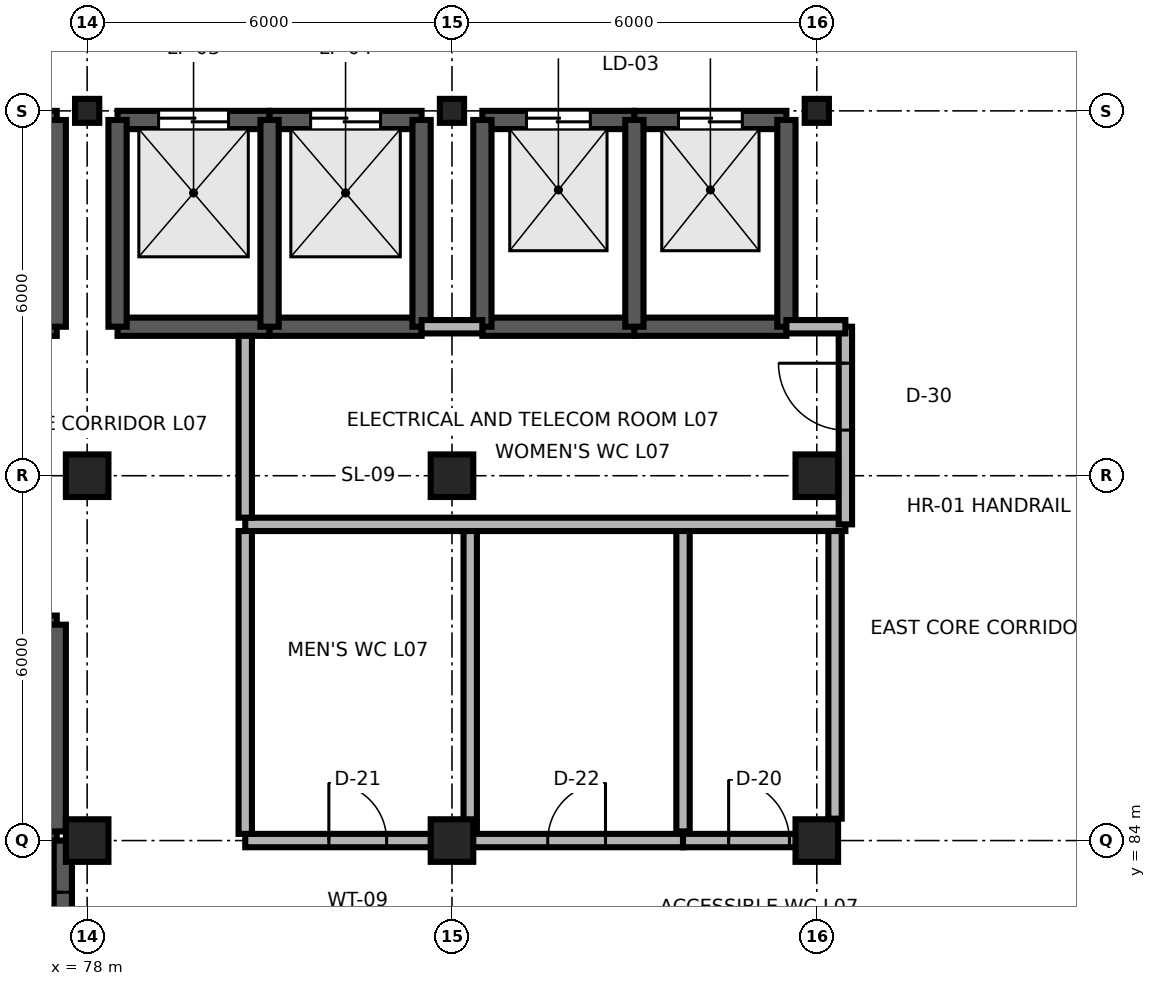
"""IFC4 building model, lengths in metres.
Left out: names, types, materials, properties, quantities, classifications, styles, units other than length and angle.
Written with IfcOpenShell. Run it as: python <this file> out.ifc"""

import sys

from ifc_helpers import new_model, si_unit, direction, frame, frame_2d, origin, origin_2d, place, context, subcontext, project, spatial, rectangle, i_section, extrude, element, fill, save


model = new_model("IFC4")
c1 = context("Model", 3, precision=1e-05, world=origin(), true_north=direction((0.0, 1.0)))
c2 = subcontext(c1, "Body", "Model", "MODEL_VIEW")
j1 = project(units=[si_unit("LENGTHUNIT", "METRE"), si_unit("PLANEANGLEUNIT", "RADIAN")], contexts=[c1])
p1 = place(None, origin())
s1 = spatial("IfcSite", under=j1, at=p1, CompositionType="ELEMENT")
p2 = place(p1, origin())
s2 = spatial("IfcBuilding", under=s1, at=p2, CompositionType="ELEMENT")
p3 = place(p2, frame((0.0, 0.0, 28.8)))
s3 = spatial("IfcBuildingStorey", under=s2, at=p3, CompositionType="ELEMENT", Elevation=28.8)
for number, where, z_axis, x_axis in (
    (1, (78.0, 84.0, 0.0), (0.0, 0.0, 1.0), (1.0, 0.0, 0.0)),
    (2, (84.0, 84.0, 0.0), (0.0, 0.0, 1.0), (1.0, 0.0, 0.0)),
    (3, (90.0, 84.0, 0.0), (0.0, 0.0, 1.0), (1.0, 0.0, 0.0)),
    (4, (78.0, 90.0, 0.0), (0.0, 0.0, 1.0), (1.0, 0.0, 0.0)),
    (5, (84.0, 90.0, 0.0), (0.0, 0.0, 1.0), (1.0, 0.0, 0.0)),
    (6, (90.0, 90.0, 0.0), (0.0, 0.0, 1.0), (1.0, 0.0, 0.0)),
):
    element("IfcColumn", number, at=place(p3, frame(where, z_axis=z_axis, x_axis=x_axis)), inside=s3, PredefinedType="COLUMN", context=c2, shape_type="SweptSolid", body=[
        extrude(rectangle(XDim=0.7, YDim=0.7, at=origin_2d()), origin(), (0.0, 0.0, 1.0), 3.9),
    ])
for number, where, z_axis, x_axis in (
    (7, (78.0, 96.0, 0.0), (0.0, 0.0, 1.0), (1.0, 0.0, 0.0)),
    (8, (84.0, 96.0, 0.0), (0.0, 0.0, 1.0), (1.0, 0.0, 0.0)),
    (9, (90.0, 96.0, 0.0), (0.0, 0.0, 1.0), (1.0, 0.0, 0.0)),
):
    element("IfcColumn", number, at=place(p3, frame(where, z_axis=z_axis, x_axis=x_axis)), inside=s3, PredefinedType="COLUMN", context=c2, shape_type="SweptSolid", body=[
        extrude(i_section(OverallWidth=0.398, OverallDepth=0.394, WebThickness=0.011, FlangeThickness=0.018, FilletRadius=0.022, at=origin_2d()), origin(), (0.0, 0.0, 1.0), 3.9),
    ])
p4 = place(p3, frame((75.0, 84.15, 0.0), z_axis=(0.0, 0.0, 1.0), x_axis=(1.0, 0.0, 0.0)))
e10 = element("IfcWall", 10, at=p4, inside=s3, PredefinedType="SHEAR", context=c2, shape_type="SweptSolid", body=[
    extrude(rectangle(XDim=2.5, YDim=0.3, at=frame_2d((1.25, 0.0))), origin(), (0.0, 0.0, 1.0), 3.74),
])
p5 = place(p4, frame((0.7, 0.0, 0.0)))
e11 = element("IfcOpeningElement", 11, at=p5, cuts=e10, PredefinedType="OPENING", context=c2, shape_type="SweptSolid", body=[
    extrude(rectangle(XDim=1.1, YDim=2.1, at=frame_2d((0.55, 1.05))), frame((0.0, 0.165, 0.0), z_axis=(0.0, -1.0, 0.0), x_axis=(1.0, 0.0, 0.0)), (0.0, 0.0, 1.0), 0.33),
])
p6 = place(p3, frame((75.0, 87.55, 0.0), z_axis=(0.0, 0.0, 1.0), x_axis=(1.0, 0.0, 0.0)))
e12 = element("IfcWall", 12, at=p6, inside=s3, PredefinedType="SHEAR", context=c2, shape_type="SweptSolid", body=[
    extrude(rectangle(XDim=2.5, YDim=0.3, at=frame_2d((1.25, 0.0))), origin(), (0.0, 0.0, 1.0), 3.74),
])
p7 = place(p3, frame((77.5, 84.15, 0.0), z_axis=(0.0, 0.0, 1.0), x_axis=(0.0, 1.0, 0.0)))
e13 = element("IfcWall", 13, at=p7, inside=s3, PredefinedType="SHEAR", context=c2, shape_type="SweptSolid", body=[
    extrude(rectangle(XDim=3.4, YDim=0.3, at=frame_2d((1.7, 0.0))), origin(), (0.0, 0.0, 1.0), 3.74),
])
p8 = place(p3, frame((75.0, 95.85, 0.0), z_axis=(0.0, 0.0, 1.0), x_axis=(1.0, 0.0, 0.0)))
e14 = element("IfcWall", 14, at=p8, inside=s3, PredefinedType="SHEAR", context=c2, shape_type="SweptSolid", body=[
    extrude(rectangle(XDim=2.5, YDim=0.3, at=frame_2d((1.25, 0.0))), origin(), (0.0, 0.0, 1.0), 3.74),
])
p9 = place(p8, frame((0.675, 0.0, 0.0)))
e15 = element("IfcOpeningElement", 15, at=p9, cuts=e14, PredefinedType="OPENING", context=c2, shape_type="SweptSolid", body=[
    extrude(rectangle(XDim=1.15, YDim=2.15, at=frame_2d((0.575, 1.075))), frame((0.0, 0.165, 0.0), z_axis=(0.0, -1.0, 0.0), x_axis=(1.0, 0.0, 0.0)), (0.0, 0.0, 1.0), 0.33),
])
p10 = place(p3, frame((75.0, 92.45, 0.0), z_axis=(0.0, 0.0, 1.0), x_axis=(1.0, 0.0, 0.0)))
e16 = element("IfcWall", 16, at=p10, inside=s3, PredefinedType="SHEAR", context=c2, shape_type="SweptSolid", body=[
    extrude(rectangle(XDim=2.5, YDim=0.3, at=frame_2d((1.25, 0.0))), origin(), (0.0, 0.0, 1.0), 3.74),
])
p11 = place(p3, frame((77.5, 92.45, 0.0), z_axis=(0.0, 0.0, 1.0), x_axis=(0.0, 1.0, 0.0)))
e17 = element("IfcWall", 17, at=p11, inside=s3, PredefinedType="SHEAR", context=c2, shape_type="SweptSolid", body=[
    extrude(rectangle(XDim=3.4, YDim=0.3, at=frame_2d((1.7, 0.0))), origin(), (0.0, 0.0, 1.0), 3.74),
])
p12 = place(p3, frame((78.5, 95.85, 0.0), z_axis=(0.0, 0.0, 1.0), x_axis=(1.0, 0.0, 0.0)))
e18 = element("IfcWall", 18, at=p12, inside=s3, PredefinedType="SHEAR", context=c2, shape_type="SweptSolid", body=[
    extrude(rectangle(XDim=2.5, YDim=0.3, at=frame_2d((1.25, 0.0))), origin(), (0.0, 0.0, 1.0), 3.74),
])
p13 = place(p12, frame((0.675, 0.0, 0.0)))
e19 = element("IfcOpeningElement", 19, at=p13, cuts=e18, PredefinedType="OPENING", context=c2, shape_type="SweptSolid", body=[
    extrude(rectangle(XDim=1.15, YDim=2.15, at=frame_2d((0.575, 1.075))), frame((0.0, 0.165, 0.0), z_axis=(0.0, -1.0, 0.0), x_axis=(1.0, 0.0, 0.0)), (0.0, 0.0, 1.0), 0.33),
])
p14 = place(p3, frame((78.5, 92.45, 0.0), z_axis=(0.0, 0.0, 1.0), x_axis=(1.0, 0.0, 0.0)))
e20 = element("IfcWall", 20, at=p14, inside=s3, PredefinedType="SHEAR", context=c2, shape_type="SweptSolid", body=[
    extrude(rectangle(XDim=2.5, YDim=0.3, at=frame_2d((1.25, 0.0))), origin(), (0.0, 0.0, 1.0), 3.74),
])
p15 = place(p3, frame((78.5, 92.45, 0.0), z_axis=(0.0, 0.0, 1.0), x_axis=(0.0, 1.0, 0.0)))
e21 = element("IfcWall", 21, at=p15, inside=s3, PredefinedType="SHEAR", context=c2, shape_type="SweptSolid", body=[
    extrude(rectangle(XDim=3.4, YDim=0.3, at=frame_2d((1.7, 0.0))), origin(), (0.0, 0.0, 1.0), 3.74),
])
p16 = place(p3, frame((81.0, 95.85, 0.0), z_axis=(0.0, 0.0, 1.0), x_axis=(1.0, 0.0, 0.0)))
e22 = element("IfcWall", 22, at=p16, inside=s3, PredefinedType="SHEAR", context=c2, shape_type="SweptSolid", body=[
    extrude(rectangle(XDim=2.5, YDim=0.3, at=frame_2d((1.25, 0.0))), origin(), (0.0, 0.0, 1.0), 3.74),
])
p17 = place(p16, frame((0.675, 0.0, 0.0)))
e23 = element("IfcOpeningElement", 23, at=p17, cuts=e22, PredefinedType="OPENING", context=c2, shape_type="SweptSolid", body=[
    extrude(rectangle(XDim=1.15, YDim=2.15, at=frame_2d((0.575, 1.075))), frame((0.0, 0.165, 0.0), z_axis=(0.0, -1.0, 0.0), x_axis=(1.0, 0.0, 0.0)), (0.0, 0.0, 1.0), 0.33),
])
p18 = place(p3, frame((81.0, 92.45, 0.0), z_axis=(0.0, 0.0, 1.0), x_axis=(1.0, 0.0, 0.0)))
e24 = element("IfcWall", 24, at=p18, inside=s3, PredefinedType="SHEAR", context=c2, shape_type="SweptSolid", body=[
    extrude(rectangle(XDim=2.5, YDim=0.3, at=frame_2d((1.25, 0.0))), origin(), (0.0, 0.0, 1.0), 3.74),
])
for number, where, z_axis, x_axis in (
    (25, (81.0, 92.45, 0.0), (0.0, 0.0, 1.0), (0.0, 1.0, 0.0)),
    (26, (83.5, 92.45, 0.0), (0.0, 0.0, 1.0), (0.0, 1.0, 0.0)),
):
    element("IfcWall", number, at=place(p3, frame(where, z_axis=z_axis, x_axis=x_axis)), inside=s3, PredefinedType="SHEAR", context=c2, shape_type="SweptSolid", body=[
        extrude(rectangle(XDim=3.4, YDim=0.3, at=frame_2d((1.7, 0.0))), origin(), (0.0, 0.0, 1.0), 3.74),
    ])
p19 = place(p3, frame((84.5, 95.85, 0.0), z_axis=(0.0, 0.0, 1.0), x_axis=(1.0, 0.0, 0.0)))
e27 = element("IfcWall", 27, at=p19, inside=s3, PredefinedType="SHEAR", context=c2, shape_type="SweptSolid", body=[
    extrude(rectangle(XDim=2.5, YDim=0.3, at=frame_2d((1.25, 0.0))), origin(), (0.0, 0.0, 1.0), 3.74),
])
p20 = place(p19, frame((0.725, 0.0, 0.0)))
e28 = element("IfcOpeningElement", 28, at=p20, cuts=e27, PredefinedType="OPENING", context=c2, shape_type="SweptSolid", body=[
    extrude(rectangle(XDim=1.05, YDim=2.1, at=frame_2d((0.525, 1.05))), frame((0.0, 0.165, 0.0), z_axis=(0.0, -1.0, 0.0), x_axis=(1.0, 0.0, 0.0)), (0.0, 0.0, 1.0), 0.33),
])
p21 = place(p3, frame((84.5, 92.45, 0.0), z_axis=(0.0, 0.0, 1.0), x_axis=(1.0, 0.0, 0.0)))
e29 = element("IfcWall", 29, at=p21, inside=s3, PredefinedType="SHEAR", context=c2, shape_type="SweptSolid", body=[
    extrude(rectangle(XDim=2.5, YDim=0.3, at=frame_2d((1.25, 0.0))), origin(), (0.0, 0.0, 1.0), 3.74),
])
p22 = place(p3, frame((84.5, 92.45, 0.0), z_axis=(0.0, 0.0, 1.0), x_axis=(0.0, 1.0, 0.0)))
e30 = element("IfcWall", 30, at=p22, inside=s3, PredefinedType="SHEAR", context=c2, shape_type="SweptSolid", body=[
    extrude(rectangle(XDim=3.4, YDim=0.3, at=frame_2d((1.7, 0.0))), origin(), (0.0, 0.0, 1.0), 3.74),
])
p23 = place(p3, frame((87.0, 95.85, 0.0), z_axis=(0.0, 0.0, 1.0), x_axis=(1.0, 0.0, 0.0)))
e31 = element("IfcWall", 31, at=p23, inside=s3, PredefinedType="SHEAR", context=c2, shape_type="SweptSolid", body=[
    extrude(rectangle(XDim=2.5, YDim=0.3, at=frame_2d((1.25, 0.0))), origin(), (0.0, 0.0, 1.0), 3.74),
])
p24 = place(p23, frame((0.725, 0.0, 0.0)))
e32 = element("IfcOpeningElement", 32, at=p24, cuts=e31, PredefinedType="OPENING", context=c2, shape_type="SweptSolid", body=[
    extrude(rectangle(XDim=1.05, YDim=2.1, at=frame_2d((0.525, 1.05))), frame((0.0, 0.165, 0.0), z_axis=(0.0, -1.0, 0.0), x_axis=(1.0, 0.0, 0.0)), (0.0, 0.0, 1.0), 0.33),
])
p25 = place(p3, frame((87.0, 92.45, 0.0), z_axis=(0.0, 0.0, 1.0), x_axis=(1.0, 0.0, 0.0)))
e33 = element("IfcWall", 33, at=p25, inside=s3, PredefinedType="SHEAR", context=c2, shape_type="SweptSolid", body=[
    extrude(rectangle(XDim=2.5, YDim=0.3, at=frame_2d((1.25, 0.0))), origin(), (0.0, 0.0, 1.0), 3.74),
])
for number, where, z_axis, x_axis in (
    (34, (87.0, 92.45, 0.0), (0.0, 0.0, 1.0), (0.0, 1.0, 0.0)),
    (35, (89.5, 92.45, 0.0), (0.0, 0.0, 1.0), (0.0, 1.0, 0.0)),
):
    element("IfcWall", number, at=place(p3, frame(where, z_axis=z_axis, x_axis=x_axis)), inside=s3, PredefinedType="SHEAR", context=c2, shape_type="SweptSolid", body=[
        extrude(rectangle(XDim=3.4, YDim=0.3, at=frame_2d((1.7, 0.0))), origin(), (0.0, 0.0, 1.0), 3.74),
    ])
p26 = place(p3, frame((77.6, 81.0, 0.0), z_axis=(0.0, 0.0, 1.0), x_axis=(0.0, 1.0, 0.0)))
e36 = element("IfcWall", 36, at=p26, inside=s3, PredefinedType="SHEAR", context=c2, shape_type="SweptSolid", body=[
    extrude(rectangle(XDim=3.0, YDim=0.3, at=frame_2d((1.5, 0.0))), origin(), (0.0, 0.0, 1.0), 3.74),
])
p27 = place(p26, frame((0.85, 0.0, 0.0)))
e37 = element("IfcOpeningElement", 37, at=p27, cuts=e36, PredefinedType="OPENING", context=c2, shape_type="SweptSolid", body=[
    extrude(rectangle(XDim=1.3, YDim=2.2, at=frame_2d((0.65, 1.1))), frame((0.0, 0.165, 0.0), z_axis=(0.0, -1.0, 0.0), x_axis=(1.0, 0.0, 0.0)), (0.0, 0.0, 1.0), 0.33),
])
p28 = place(p3, frame((80.6, 84.0, 0.0), z_axis=(0.0, 0.0, 1.0), x_axis=(1.0, 0.0, 0.0)))
e38 = element("IfcWall", 38, at=p28, inside=s3, PredefinedType="PARTITIONING", context=c2, shape_type="SweptSolid", body=[
    extrude(rectangle(XDim=3.7, YDim=0.22, at=frame_2d((1.85, 0.0))), origin(), (0.0, 0.0, 1.0), 3.352),
])
p29 = place(p28, frame((1.375, 0.0, 0.0)))
e39 = element("IfcOpeningElement", 39, at=p29, cuts=e38, PredefinedType="OPENING", context=c2, shape_type="SweptSolid", body=[
    extrude(rectangle(XDim=0.95, YDim=2.15, at=frame_2d((0.475, 1.075))), frame((0.0, 0.125, 0.0), z_axis=(0.0, -1.0, 0.0), x_axis=(1.0, 0.0, 0.0)), (0.0, 0.0, 1.0), 0.25),
])
p30 = place(p3, frame((84.3, 84.0, 0.0), z_axis=(0.0, 0.0, 1.0), x_axis=(1.0, 0.0, 0.0)))
e40 = element("IfcWall", 40, at=p30, inside=s3, PredefinedType="PARTITIONING", context=c2, shape_type="SweptSolid", body=[
    extrude(rectangle(XDim=3.5, YDim=0.22, at=frame_2d((1.75, 0.0))), origin(), (0.0, 0.0, 1.0), 3.352),
])
p31 = place(p30, frame((1.275, 0.0, 0.0)))
e41 = element("IfcOpeningElement", 41, at=p31, cuts=e40, PredefinedType="OPENING", context=c2, shape_type="SweptSolid", body=[
    extrude(rectangle(XDim=0.95, YDim=2.1, at=frame_2d((0.475, 1.05))), frame((0.0, 0.125, 0.0), z_axis=(0.0, -1.0, 0.0), x_axis=(1.0, 0.0, 0.0)), (0.0, 0.0, 1.0), 0.25),
])
p32 = place(p3, frame((87.8, 84.0, 0.0), z_axis=(0.0, 0.0, 1.0), x_axis=(1.0, 0.0, 0.0)))
e42 = element("IfcWall", 42, at=p32, inside=s3, PredefinedType="PARTITIONING", context=c2, shape_type="SweptSolid", body=[
    extrude(rectangle(XDim=2.5, YDim=0.22, at=frame_2d((1.25, 0.0))), origin(), (0.0, 0.0, 1.0), 3.352),
])
p33 = place(p32, frame((0.75, 0.0, 0.0)))
e43 = element("IfcOpeningElement", 43, at=p33, cuts=e42, PredefinedType="OPENING", context=c2, shape_type="SweptSolid", body=[
    extrude(rectangle(XDim=1.0, YDim=2.15, at=frame_2d((0.5, 1.075))), frame((0.0, 0.125, 0.0), z_axis=(0.0, -1.0, 0.0), x_axis=(1.0, 0.0, 0.0)), (0.0, 0.0, 1.0), 0.25),
])
for number, where, z_axis, x_axis in (
    (44, (84.3, 84.15, 0.0), (0.0, 0.0, 1.0), (0.0, 1.0, 0.0)),
    (45, (87.8, 84.15, 0.0), (0.0, 0.0, 1.0), (0.0, 1.0, 0.0)),
):
    element("IfcWall", number, at=place(p3, frame(where, z_axis=z_axis, x_axis=x_axis)), inside=s3, PredefinedType="PARTITIONING", context=c2, shape_type="SweptSolid", body=[
        extrude(rectangle(XDim=5.0, YDim=0.22, at=frame_2d((2.5, 0.0))), origin(), (0.0, 0.0, 1.0), 3.74),
    ])
p34 = place(p3, frame((80.6, 89.2, 0.0), z_axis=(0.0, 0.0, 1.0), x_axis=(1.0, 0.0, 0.0)))
e46 = element("IfcWall", 46, at=p34, inside=s3, PredefinedType="PARTITIONING", context=c2, shape_type="SweptSolid", body=[
    extrude(rectangle(XDim=9.87, YDim=0.22, at=frame_2d((4.935, 0.0))), origin(), (0.0, 0.0, 1.0), 3.74),
])
p35 = place(p3, frame((90.47, 89.2, 0.0), z_axis=(0.0, 0.0, 1.0), x_axis=(0.0, 1.0, 0.0)))
e47 = element("IfcWall", 47, at=p35, inside=s3, PredefinedType="PARTITIONING", context=c2, shape_type="SweptSolid", body=[
    extrude(rectangle(XDim=3.25, YDim=0.22, at=frame_2d((1.625, 0.0))), origin(), (0.0, 0.0, 1.0), 3.74),
])
p36 = place(p35, frame((1.55, 0.0, 0.0)))
e48 = element("IfcOpeningElement", 48, at=p36, cuts=e47, PredefinedType="OPENING", context=c2, shape_type="SweptSolid", body=[
    extrude(rectangle(XDim=1.1, YDim=2.15, at=frame_2d((0.55, 1.075))), frame((0.0, 0.125, 0.0), z_axis=(0.0, -1.0, 0.0), x_axis=(1.0, 0.0, 0.0)), (0.0, 0.0, 1.0), 0.25),
])
p37 = place(p3, frame((80.6, 84.11, 0.0), z_axis=(0.0, 0.0, 1.0), x_axis=(0.0, 1.0, 0.0)))
e49 = element("IfcWall", 49, at=p37, inside=s3, PredefinedType="PARTITIONING", context=c2, shape_type="SweptSolid", body=[
    extrude(rectangle(XDim=4.98, YDim=0.22, at=frame_2d((2.49, 0.0))), origin(), (0.0, 0.0, 1.0), 3.74),
])
p38 = place(p3, frame((90.3, 84.36, 0.0), z_axis=(0.0, 0.0, 1.0), x_axis=(0.0, 1.0, 0.0)))
e50 = element("IfcWall", 50, at=p38, inside=s3, PredefinedType="PARTITIONING", context=c2, shape_type="SweptSolid", body=[
    extrude(rectangle(XDim=4.73, YDim=0.22, at=frame_2d((2.365, 0.0))), origin(), (0.0, 0.0, 1.0), 3.74),
])
p39 = place(p3, frame((80.6, 89.31, 0.0), z_axis=(0.0, 0.0, 1.0), x_axis=(0.0, 1.0, 0.0)))
e51 = element("IfcWall", 51, at=p39, inside=s3, PredefinedType="PARTITIONING", context=c2, shape_type="SweptSolid", body=[
    extrude(rectangle(XDim=2.99, YDim=0.22, at=frame_2d((1.495, 0.0))), origin(), (0.0, 0.0, 1.0), 3.74),
])
p40 = place(p3, frame((83.5, 92.45, 0.0), z_axis=(0.0, 0.0, 1.0), x_axis=(1.0, 0.0, 0.0)))
e52 = element("IfcWall", 52, at=p40, inside=s3, PredefinedType="PARTITIONING", context=c2, shape_type="SweptSolid", body=[
    extrude(rectangle(XDim=1.0, YDim=0.22, at=frame_2d((0.5, 0.0))), origin(), (0.0, 0.0, 1.0), 3.74),
])
p41 = place(p3, frame((89.5, 92.45, 0.0), z_axis=(0.0, 0.0, 1.0), x_axis=(1.0, 0.0, 0.0)))
e53 = element("IfcWall", 53, at=p41, inside=s3, PredefinedType="PARTITIONING", context=c2, shape_type="SweptSolid", body=[
    extrude(rectangle(XDim=0.97, YDim=0.22, at=frame_2d((0.485, 0.0))), origin(), (0.0, 0.0, 1.0), 3.74),
])
p42 = place(p13, origin())
e54 = element("IfcDoor", 54, at=p42, inside=s3, OperationType="DOUBLE_DOOR_SLIDING", PredefinedType="DOOR", context=c2, shape_type="SweptSolid", body=[
    extrude(rectangle(XDim=1.15, YDim=2.15, at=frame_2d((0.575, 1.075))), frame((0.0, 0.025, 0.0), z_axis=(0.0, -1.0, 0.0), x_axis=(1.0, 0.0, 0.0)), (0.0, 0.0, 1.0), 0.05),
])
fill(e19, e54)
p43 = place(p17, origin())
e55 = element("IfcDoor", 55, at=p43, inside=s3, OperationType="DOUBLE_DOOR_SLIDING", PredefinedType="DOOR", context=c2, shape_type="SweptSolid", body=[
    extrude(rectangle(XDim=1.15, YDim=2.15, at=frame_2d((0.575, 1.075))), frame((0.0, 0.025, 0.0), z_axis=(0.0, -1.0, 0.0), x_axis=(1.0, 0.0, 0.0)), (0.0, 0.0, 1.0), 0.05),
])
fill(e23, e55)
p44 = place(p20, origin())
e56 = element("IfcDoor", 56, at=p44, inside=s3, OperationType="DOUBLE_DOOR_SLIDING", PredefinedType="DOOR", context=c2, shape_type="SweptSolid", body=[
    extrude(rectangle(XDim=1.05, YDim=2.1, at=frame_2d((0.525, 1.05))), frame((0.0, 0.025, 0.0), z_axis=(0.0, -1.0, 0.0), x_axis=(1.0, 0.0, 0.0)), (0.0, 0.0, 1.0), 0.05),
])
fill(e28, e56)
p45 = place(p24, origin())
e57 = element("IfcDoor", 57, at=p45, inside=s3, OperationType="DOUBLE_DOOR_SLIDING", PredefinedType="DOOR", context=c2, shape_type="SweptSolid", body=[
    extrude(rectangle(XDim=1.05, YDim=2.1, at=frame_2d((0.525, 1.05))), frame((0.0, 0.025, 0.0), z_axis=(0.0, -1.0, 0.0), x_axis=(1.0, 0.0, 0.0)), (0.0, 0.0, 1.0), 0.05),
])
fill(e32, e57)
p46 = place(p27, origin())
e58 = element("IfcDoor", 58, at=p46, inside=s3, OperationType="SINGLE_SWING_RIGHT", PredefinedType="DOOR", context=c2, shape_type="SweptSolid", body=[
    extrude(rectangle(XDim=1.3, YDim=2.2, at=frame_2d((0.65, 1.1))), frame((0.0, 0.025, 0.0), z_axis=(0.0, -1.0, 0.0), x_axis=(1.0, 0.0, 0.0)), (0.0, 0.0, 1.0), 0.05),
])
fill(e37, e58)
p47 = place(p29, origin())
e59 = element("IfcDoor", 59, at=p47, inside=s3, OperationType="SINGLE_SWING_LEFT", PredefinedType="DOOR", context=c2, shape_type="SweptSolid", body=[
    extrude(rectangle(XDim=0.95, YDim=2.15, at=frame_2d((0.475, 1.075))), frame((0.0, 0.025, 0.0), z_axis=(0.0, -1.0, 0.0), x_axis=(1.0, 0.0, 0.0)), (0.0, 0.0, 1.0), 0.05),
])
fill(e39, e59)
p48 = place(p31, origin())
e60 = element("IfcDoor", 60, at=p48, inside=s3, OperationType="SINGLE_SWING_RIGHT", PredefinedType="DOOR", context=c2, shape_type="SweptSolid", body=[
    extrude(rectangle(XDim=0.95, YDim=2.1, at=frame_2d((0.475, 1.05))), frame((0.0, 0.025, 0.0), z_axis=(0.0, -1.0, 0.0), x_axis=(1.0, 0.0, 0.0)), (0.0, 0.0, 1.0), 0.05),
])
fill(e41, e60)
p49 = place(p33, origin())
e61 = element("IfcDoor", 61, at=p49, inside=s3, OperationType="SINGLE_SWING_LEFT", PredefinedType="DOOR", context=c2, shape_type="SweptSolid", body=[
    extrude(rectangle(XDim=1.0, YDim=2.15, at=frame_2d((0.5, 1.075))), frame((0.0, 0.025, 0.0), z_axis=(0.0, -1.0, 0.0), x_axis=(1.0, 0.0, 0.0)), (0.0, 0.0, 1.0), 0.05),
])
fill(e43, e61)
p50 = place(p36, origin())
e62 = element("IfcDoor", 62, at=p50, inside=s3, OperationType="SINGLE_SWING_RIGHT", PredefinedType="DOOR", context=c2, shape_type="SweptSolid", body=[
    extrude(rectangle(XDim=1.1, YDim=2.15, at=frame_2d((0.55, 1.075))), frame((0.0, 0.025, 0.0), z_axis=(0.0, -1.0, 0.0), x_axis=(1.0, 0.0, 0.0)), (0.0, 0.0, 1.0), 0.05),
])
fill(e48, e62)
save(model, sys.argv[1])
